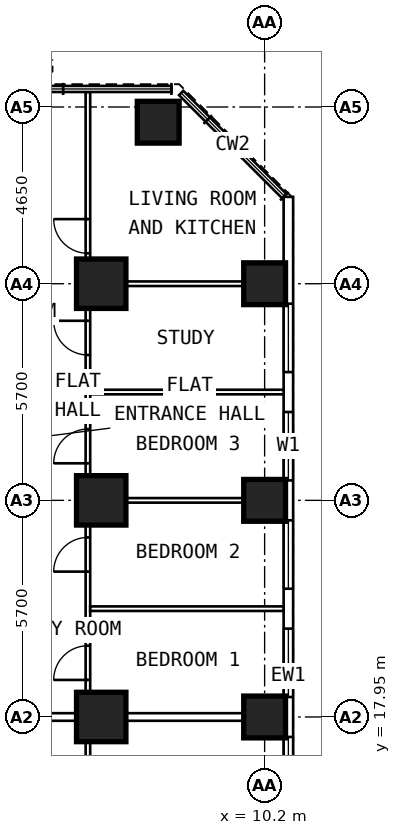
"""IFC4 building model, lengths in metres.
Left out: names, types, materials, properties, quantities, classifications, styles, units other than length and angle.
Written with IfcOpenShell. Run it as: python <this file> out.ifc"""

import sys

from ifc_helpers import new_model, si_unit, direction, frame, frame_2d, origin, origin_2d, place, context, subcontext, project, spatial, rectangle, extrude, element, fill, save


model = new_model("IFC4")
c1 = context("Model", 3, precision=1e-05, world=origin(), true_north=direction((0.0, 1.0)))
c2 = subcontext(c1, "Body", "Model", "MODEL_VIEW")
j1 = project(units=[si_unit("LENGTHUNIT", "METRE"), si_unit("PLANEANGLEUNIT", "RADIAN")], contexts=[c1])
p1 = place(None, origin())
s1 = spatial("IfcSite", under=j1, at=p1, CompositionType="ELEMENT")
p2 = place(p1, origin())
s2 = spatial("IfcBuilding", under=s1, at=p2, CompositionType="ELEMENT")
p3 = place(p2, frame((0.0, 0.0, 43.0)))
s3 = spatial("IfcBuildingStorey", under=s2, at=p3, CompositionType="ELEMENT", Elevation=43.0)
for number, where, z_axis, x_axis in (
    (1, (10.2, 17.95, 0.0), (0.0, 0.0, 1.0), (0.0, 1.0, 0.0)),
    (2, (10.2, 23.65, 0.0), (0.0, 0.0, 1.0), (0.0, 1.0, 0.0)),
    (3, (10.2, 29.35, 0.0), (0.0, 0.0, 1.0), (0.0, 1.0, 0.0)),
    (4, (7.4, 33.6, 0.0), (0.0, 0.0, 1.0), (0.0, 1.0, 0.0)),
):
    element("IfcColumn", number, at=place(p3, frame(where, z_axis=z_axis, x_axis=x_axis)), inside=s3, PredefinedType="COLUMN", context=c2, shape_type="SweptSolid", body=[
        extrude(rectangle(XDim=1.1, YDim=1.1, at=origin_2d()), origin(), (0.0, 0.0, 1.0), 3.6),
    ])
for number, where, z_axis, x_axis in (
    (5, (5.9, 17.95, 0.0), (0.0, 0.0, 1.0), (0.0, 1.0, 0.0)),
    (6, (5.9, 23.65, 0.0), (0.0, 0.0, 1.0), (0.0, 1.0, 0.0)),
    (7, (5.9, 29.35, 0.0), (0.0, 0.0, 1.0), (0.0, 1.0, 0.0)),
):
    element("IfcColumn", number, at=place(p3, frame(where, z_axis=z_axis, x_axis=x_axis)), inside=s3, PredefinedType="COLUMN", context=c2, shape_type="SweptSolid", body=[
        extrude(rectangle(XDim=1.3, YDim=1.3, at=origin_2d()), origin(), (0.0, 0.0, 1.0), 3.6),
    ])
p4 = place(p3, frame((10.825, 6.409, 0.0), z_axis=(0.0, 0.0, 1.0), x_axis=(0.0, 1.0, 0.0)))
e8 = element("IfcWall", 8, at=p4, inside=s3, PredefinedType="SOLIDWALL", context=c2, shape_type="SweptSolid", body=[
    extrude(rectangle(XDim=25.226, YDim=0.25, at=frame_2d((12.613, 0.0))), origin(), (0.0, 0.0, 1.0), 3.35),
])
p5 = place(p4, frame((0.666, 0.0, 0.8)))
e9 = element("IfcOpeningElement", 9, at=p5, cuts=e8, PredefinedType="OPENING", context=c2, shape_type="SweptSolid", body=[
    extrude(rectangle(XDim=1.8, YDim=1.8, at=frame_2d((0.9, 0.9))), frame((0.0, 0.137, 0.0), z_axis=(0.0, -1.0, 0.0), x_axis=(1.0, 0.0, 0.0)), (0.0, 0.0, 1.0), 0.274),
])
p6 = place(p4, frame((3.516, 0.0, 0.8)))
e10 = element("IfcOpeningElement", 10, at=p6, cuts=e8, PredefinedType="OPENING", context=c2, shape_type="SweptSolid", body=[
    extrude(rectangle(XDim=1.8, YDim=1.8, at=frame_2d((0.9, 0.9))), frame((0.0, 0.137, 0.0), z_axis=(0.0, -1.0, 0.0), x_axis=(1.0, 0.0, 0.0)), (0.0, 0.0, 1.0), 0.274),
])
p7 = place(p4, frame((6.366, 0.0, 0.8)))
e11 = element("IfcOpeningElement", 11, at=p7, cuts=e8, PredefinedType="OPENING", context=c2, shape_type="SweptSolid", body=[
    extrude(rectangle(XDim=1.8, YDim=1.8, at=frame_2d((0.9, 0.9))), frame((0.0, 0.137, 0.0), z_axis=(0.0, -1.0, 0.0), x_axis=(1.0, 0.0, 0.0)), (0.0, 0.0, 1.0), 0.274),
])
p8 = place(p4, frame((9.216, 0.0, 0.8)))
e12 = element("IfcOpeningElement", 12, at=p8, cuts=e8, PredefinedType="OPENING", context=c2, shape_type="SweptSolid", body=[
    extrude(rectangle(XDim=1.8, YDim=1.8, at=frame_2d((0.9, 0.9))), frame((0.0, 0.137, 0.0), z_axis=(0.0, -1.0, 0.0), x_axis=(1.0, 0.0, 0.0)), (0.0, 0.0, 1.0), 0.274),
])
p9 = place(p4, frame((12.066, 0.0, 0.8)))
e13 = element("IfcOpeningElement", 13, at=p9, cuts=e8, PredefinedType="OPENING", context=c2, shape_type="SweptSolid", body=[
    extrude(rectangle(XDim=1.8, YDim=1.8, at=frame_2d((0.9, 0.9))), frame((0.0, 0.137, 0.0), z_axis=(0.0, -1.0, 0.0), x_axis=(1.0, 0.0, 0.0)), (0.0, 0.0, 1.0), 0.274),
])
p10 = place(p4, frame((14.916, 0.0, 0.8)))
e14 = element("IfcOpeningElement", 14, at=p10, cuts=e8, PredefinedType="OPENING", context=c2, shape_type="SweptSolid", body=[
    extrude(rectangle(XDim=1.8, YDim=1.8, at=frame_2d((0.9, 0.9))), frame((0.0, 0.137, 0.0), z_axis=(0.0, -1.0, 0.0), x_axis=(1.0, 0.0, 0.0)), (0.0, 0.0, 1.0), 0.274),
])
p11 = place(p4, frame((17.766, 0.0, 0.8)))
e15 = element("IfcOpeningElement", 15, at=p11, cuts=e8, PredefinedType="OPENING", context=c2, shape_type="SweptSolid", body=[
    extrude(rectangle(XDim=1.8, YDim=1.8, at=frame_2d((0.9, 0.9))), frame((0.0, 0.137, 0.0), z_axis=(0.0, -1.0, 0.0), x_axis=(1.0, 0.0, 0.0)), (0.0, 0.0, 1.0), 0.274),
])
p12 = place(p4, frame((20.616, 0.0, 0.8)))
e16 = element("IfcOpeningElement", 16, at=p12, cuts=e8, PredefinedType="OPENING", context=c2, shape_type="SweptSolid", body=[
    extrude(rectangle(XDim=1.8, YDim=1.8, at=frame_2d((0.9, 0.9))), frame((0.0, 0.137, 0.0), z_axis=(0.0, -1.0, 0.0), x_axis=(1.0, 0.0, 0.0)), (0.0, 0.0, 1.0), 0.274),
])
p13 = place(p3, frame((5.55, 9.691, 0.0), z_axis=(0.0, 0.0, 1.0), x_axis=(0.0, 1.0, 0.0)))
e17 = element("IfcWall", 17, at=p13, inside=s3, PredefinedType="PARTITIONING", context=c2, shape_type="SweptSolid", body=[
    extrude(rectangle(XDim=8.009, YDim=0.12, at=frame_2d((4.004, 0.0))), origin(), (0.0, 0.0, 1.0), 3.35),
])
p14 = place(p13, frame((4.959, 0.0, 0.0)))
e18 = element("IfcOpeningElement", 18, at=p14, cuts=e17, PredefinedType="OPENING", context=c2, shape_type="SweptSolid", body=[
    extrude(rectangle(XDim=0.9, YDim=2.1, at=frame_2d((0.45, 1.05))), frame((0.0, 0.072, 0.0), z_axis=(0.0, -1.0, 0.0), x_axis=(1.0, 0.0, 0.0)), (0.0, 0.0, 1.0), 0.144),
])
p15 = place(p3, frame((5.55, 18.05, 0.0), z_axis=(0.0, 0.0, 1.0), x_axis=(0.0, 1.0, 0.0)))
e19 = element("IfcWall", 19, at=p15, inside=s3, PredefinedType="PARTITIONING", context=c2, shape_type="SweptSolid", body=[
    extrude(rectangle(XDim=16.345, YDim=0.12, at=frame_2d((8.172, 0.0))), origin(), (0.0, 0.0, 1.0), 3.35),
])
p16 = place(p15, frame((0.875, 0.0, 0.0)))
e20 = element("IfcOpeningElement", 20, at=p16, cuts=e19, PredefinedType="OPENING", context=c2, shape_type="SweptSolid", body=[
    extrude(rectangle(XDim=0.9, YDim=2.1, at=frame_2d((0.45, 1.05))), frame((0.0, 0.072, 0.0), z_axis=(0.0, -1.0, 0.0), x_axis=(1.0, 0.0, 0.0)), (0.0, 0.0, 1.0), 0.144),
])
p17 = place(p15, frame((3.725, 0.0, 0.0)))
e21 = element("IfcOpeningElement", 21, at=p17, cuts=e19, PredefinedType="OPENING", context=c2, shape_type="SweptSolid", body=[
    extrude(rectangle(XDim=0.9, YDim=2.1, at=frame_2d((0.45, 1.05))), frame((0.0, 0.072, 0.0), z_axis=(0.0, -1.0, 0.0), x_axis=(1.0, 0.0, 0.0)), (0.0, 0.0, 1.0), 0.144),
])
p18 = place(p15, frame((6.575, 0.0, 0.0)))
e22 = element("IfcOpeningElement", 22, at=p18, cuts=e19, PredefinedType="OPENING", context=c2, shape_type="SweptSolid", body=[
    extrude(rectangle(XDim=0.9, YDim=2.1, at=frame_2d((0.45, 1.05))), frame((0.0, 0.072, 0.0), z_axis=(0.0, -1.0, 0.0), x_axis=(1.0, 0.0, 0.0)), (0.0, 0.0, 1.0), 0.144),
])
p19 = place(p15, frame((9.425, 0.0, 0.0)))
e23 = element("IfcOpeningElement", 23, at=p19, cuts=e19, PredefinedType="OPENING", context=c2, shape_type="SweptSolid", body=[
    extrude(rectangle(XDim=0.9, YDim=2.1, at=frame_2d((0.45, 1.05))), frame((0.0, 0.072, 0.0), z_axis=(0.0, -1.0, 0.0), x_axis=(1.0, 0.0, 0.0)), (0.0, 0.0, 1.0), 0.144),
])
p20 = place(p15, frame((12.1, 0.0, 0.0)))
e24 = element("IfcOpeningElement", 24, at=p20, cuts=e19, PredefinedType="OPENING", context=c2, shape_type="SweptSolid", body=[
    extrude(rectangle(XDim=0.9, YDim=2.1, at=frame_2d((0.45, 1.05))), frame((0.0, 0.072, 0.0), z_axis=(0.0, -1.0, 0.0), x_axis=(1.0, 0.0, 0.0)), (0.0, 0.0, 1.0), 0.144),
])
p21 = place(p3, frame((5.61, 20.8, 0.0), z_axis=(0.0, 0.0, 1.0), x_axis=(1.0, 0.0, 0.0)))
e25 = element("IfcWall", 25, at=p21, inside=s3, PredefinedType="PARTITIONING", context=c2, shape_type="SweptSolid", body=[
    extrude(rectangle(XDim=5.09, YDim=0.12, at=frame_2d((2.545, 0.0))), origin(), (0.0, 0.0, 1.0), 3.35),
])
p22 = place(p3, frame((5.61, 23.65, 0.0), z_axis=(0.0, 0.0, 1.0), x_axis=(1.0, 0.0, 0.0)))
e26 = element("IfcWall", 26, at=p22, inside=s3, PredefinedType="PARTITIONING", context=c2, shape_type="SweptSolid", body=[
    extrude(rectangle(XDim=5.09, YDim=0.12, at=frame_2d((2.545, 0.0))), origin(), (0.0, 0.0, 1.0), 2.45),
])
p23 = place(p3, frame((5.61, 26.5, 0.0), z_axis=(0.0, 0.0, 1.0), x_axis=(1.0, 0.0, 0.0)))
e27 = element("IfcWall", 27, at=p23, inside=s3, PredefinedType="PARTITIONING", context=c2, shape_type="SweptSolid", body=[
    extrude(rectangle(XDim=5.09, YDim=0.12, at=frame_2d((2.545, 0.0))), origin(), (0.0, 0.0, 1.0), 3.35),
])
p24 = place(p3, frame((5.61, 29.35, 0.0), z_axis=(0.0, 0.0, 1.0), x_axis=(1.0, 0.0, 0.0)))
e28 = element("IfcWall", 28, at=p24, inside=s3, PredefinedType="PARTITIONING", context=c2, shape_type="SweptSolid", body=[
    extrude(rectangle(XDim=5.09, YDim=0.12, at=frame_2d((2.545, 0.0))), origin(), (0.0, 0.0, 1.0), 2.45),
])
p25 = place(p3, frame((2.1, 17.95, 0.0), z_axis=(0.0, 0.0, 1.0), x_axis=(1.0, 0.0, 0.0)))
e29 = element("IfcWall", 29, at=p25, inside=s3, PredefinedType="PARTITIONING", context=c2, shape_type="SweptSolid", body=[
    extrude(rectangle(XDim=8.6, YDim=0.2, at=frame_2d((4.3, 0.0))), origin(), (0.0, 0.0, 1.0), 2.45),
])
p26 = place(p8, origin())
e30 = element("IfcWindow", 30, at=p26, inside=s3, PartitioningType="SINGLE_PANEL", PredefinedType="WINDOW", context=c2, shape_type="SweptSolid", body=[
    extrude(rectangle(XDim=1.8, YDim=1.8, at=frame_2d((0.9, 0.9))), frame((0.0, 0.03, 0.0), z_axis=(0.0, -1.0, 0.0), x_axis=(1.0, 0.0, 0.0)), (0.0, 0.0, 1.0), 0.06),
])
fill(e12, e30)
p27 = place(p9, origin())
e31 = element("IfcWindow", 31, at=p27, inside=s3, PartitioningType="SINGLE_PANEL", PredefinedType="WINDOW", context=c2, shape_type="SweptSolid", body=[
    extrude(rectangle(XDim=1.8, YDim=1.8, at=frame_2d((0.9, 0.9))), frame((0.0, 0.03, 0.0), z_axis=(0.0, -1.0, 0.0), x_axis=(1.0, 0.0, 0.0)), (0.0, 0.0, 1.0), 0.06),
])
fill(e13, e31)
p28 = place(p10, origin())
e32 = element("IfcWindow", 32, at=p28, inside=s3, PartitioningType="SINGLE_PANEL", PredefinedType="WINDOW", context=c2, shape_type="SweptSolid", body=[
    extrude(rectangle(XDim=1.8, YDim=1.8, at=frame_2d((0.9, 0.9))), frame((0.0, 0.03, 0.0), z_axis=(0.0, -1.0, 0.0), x_axis=(1.0, 0.0, 0.0)), (0.0, 0.0, 1.0), 0.06),
])
fill(e14, e32)
p29 = place(p11, origin())
e33 = element("IfcWindow", 33, at=p29, inside=s3, PartitioningType="SINGLE_PANEL", PredefinedType="WINDOW", context=c2, shape_type="SweptSolid", body=[
    extrude(rectangle(XDim=1.8, YDim=1.8, at=frame_2d((0.9, 0.9))), frame((0.0, 0.03, 0.0), z_axis=(0.0, -1.0, 0.0), x_axis=(1.0, 0.0, 0.0)), (0.0, 0.0, 1.0), 0.06),
])
fill(e15, e33)
p30 = place(p12, origin())
e34 = element("IfcWindow", 34, at=p30, inside=s3, PartitioningType="SINGLE_PANEL", PredefinedType="WINDOW", context=c2, shape_type="SweptSolid", body=[
    extrude(rectangle(XDim=1.8, YDim=1.8, at=frame_2d((0.9, 0.9))), frame((0.0, 0.03, 0.0), z_axis=(0.0, -1.0, 0.0), x_axis=(1.0, 0.0, 0.0)), (0.0, 0.0, 1.0), 0.06),
])
fill(e16, e34)
p31 = place(p16, origin())
e35 = element("IfcDoor", 35, at=p31, inside=s3, OperationType="SINGLE_SWING_LEFT", PredefinedType="DOOR", context=c2, shape_type="SweptSolid", body=[
    extrude(rectangle(XDim=0.9, YDim=2.1, at=frame_2d((0.45, 1.05))), frame((0.0, 0.025, 0.0), z_axis=(0.0, -1.0, 0.0), x_axis=(1.0, 0.0, 0.0)), (0.0, 0.0, 1.0), 0.05),
])
fill(e20, e35)
p32 = place(p17, origin())
e36 = element("IfcDoor", 36, at=p32, inside=s3, OperationType="SINGLE_SWING_LEFT", PredefinedType="DOOR", context=c2, shape_type="SweptSolid", body=[
    extrude(rectangle(XDim=0.9, YDim=2.1, at=frame_2d((0.45, 1.05))), frame((0.0, 0.025, 0.0), z_axis=(0.0, -1.0, 0.0), x_axis=(1.0, 0.0, 0.0)), (0.0, 0.0, 1.0), 0.05),
])
fill(e21, e36)
p33 = place(p18, origin())
e37 = element("IfcDoor", 37, at=p33, inside=s3, OperationType="SINGLE_SWING_LEFT", PredefinedType="DOOR", context=c2, shape_type="SweptSolid", body=[
    extrude(rectangle(XDim=0.9, YDim=2.1, at=frame_2d((0.45, 1.05))), frame((0.0, 0.025, 0.0), z_axis=(0.0, -1.0, 0.0), x_axis=(1.0, 0.0, 0.0)), (0.0, 0.0, 1.0), 0.05),
])
fill(e22, e37)
p34 = place(p19, origin())
e38 = element("IfcDoor", 38, at=p34, inside=s3, OperationType="SINGLE_SWING_RIGHT", PredefinedType="DOOR", context=c2, shape_type="SweptSolid", body=[
    extrude(rectangle(XDim=0.9, YDim=2.1, at=frame_2d((0.45, 1.05))), frame((0.0, 0.025, 0.0), z_axis=(0.0, -1.0, 0.0), x_axis=(1.0, 0.0, 0.0)), (0.0, 0.0, 1.0), 0.05),
])
fill(e23, e38)
p35 = place(p20, origin())
e39 = element("IfcDoor", 39, at=p35, inside=s3, OperationType="SINGLE_SWING_RIGHT", PredefinedType="DOOR", context=c2, shape_type="SweptSolid", body=[
    extrude(rectangle(XDim=0.9, YDim=2.1, at=frame_2d((0.45, 1.05))), frame((0.0, 0.025, 0.0), z_axis=(0.0, -1.0, 0.0), x_axis=(1.0, 0.0, 0.0)), (0.0, 0.0, 1.0), 0.05),
])
fill(e24, e39)
save(model, sys.argv[1])
